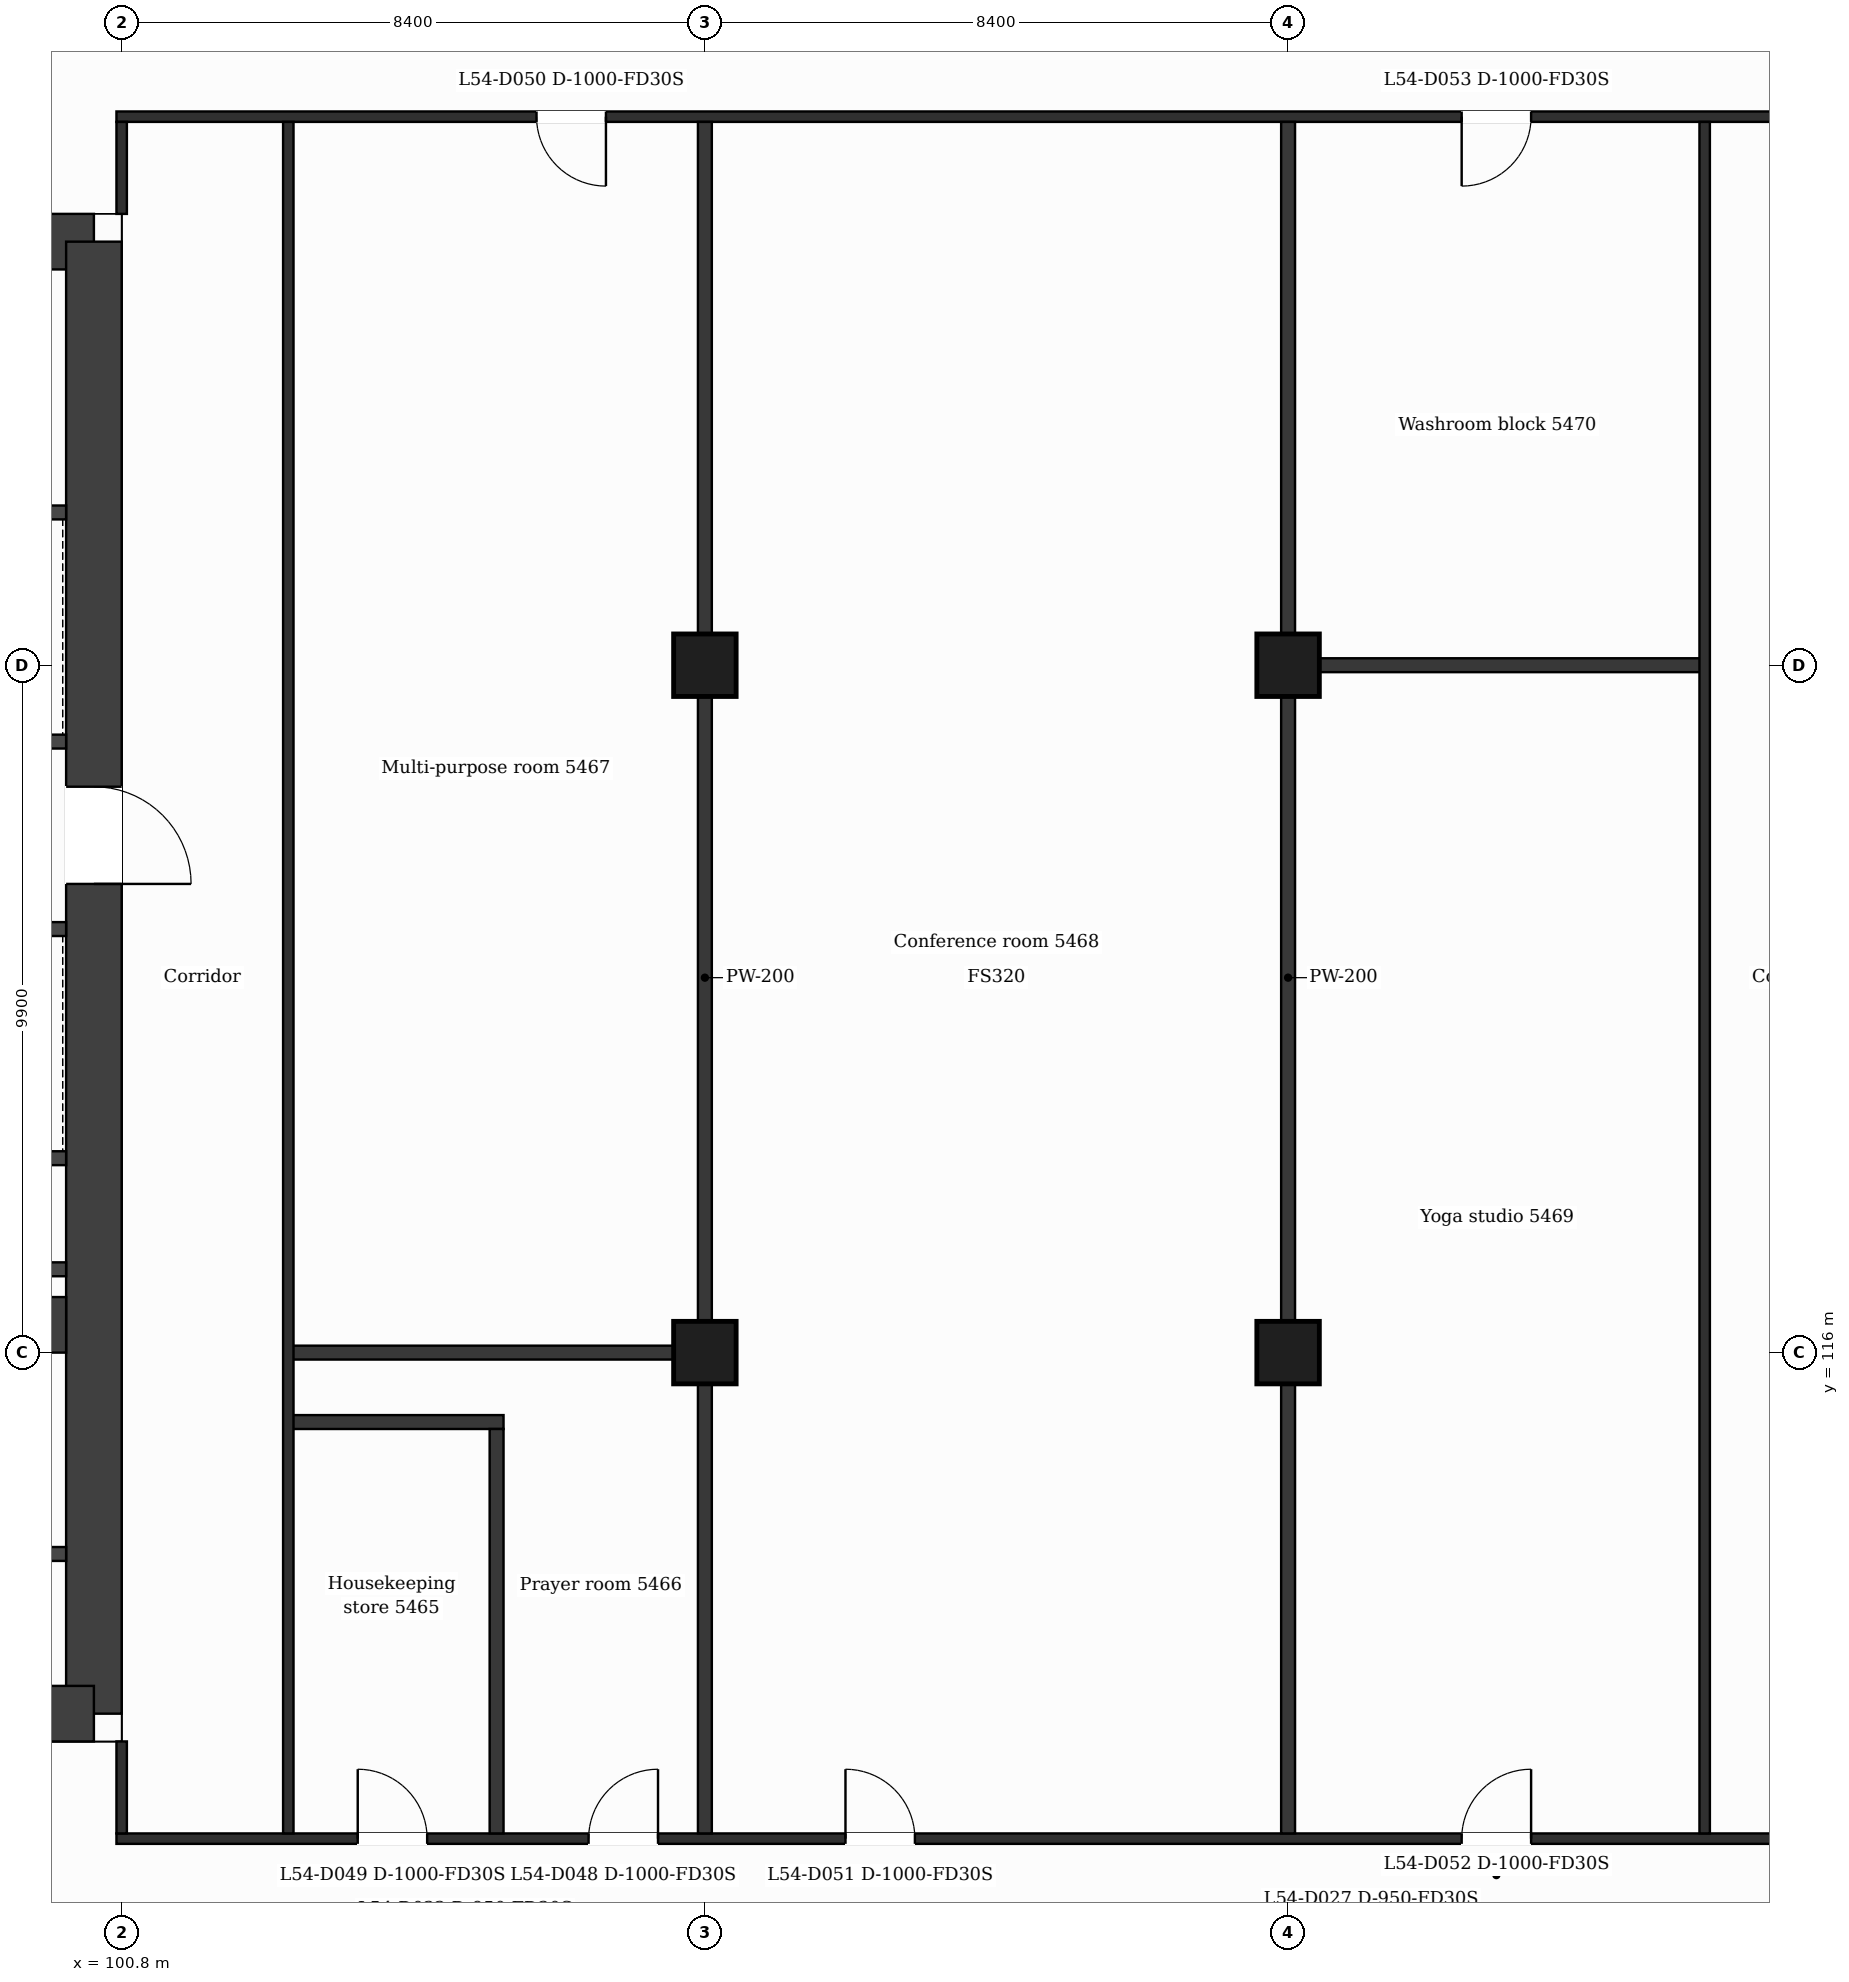
"""IFC4 building model, lengths in metres.
Left out: names, types, materials, properties, quantities, classifications, styles, units other than length and angle.
Written with IfcOpenShell. Run it as: python <this file> out.ifc"""

import sys

from ifc_helpers import new_model, si_unit, direction, frame, frame_2d, origin, origin_2d, place, context, subcontext, project, spatial, rectangle, extrude, element, fill, save


model = new_model("IFC4")
c1 = context("Model", 3, precision=1e-05, world=origin(), true_north=direction((0.0, 1.0)))
c2 = subcontext(c1, "Body", "Model", "MODEL_VIEW")
j1 = project(units=[si_unit("LENGTHUNIT", "METRE"), si_unit("PLANEANGLEUNIT", "RADIAN")], contexts=[c1])
p1 = place(None, origin())
s1 = spatial("IfcSite", under=j1, at=p1, CompositionType="ELEMENT")
p2 = place(p1, origin())
s2 = spatial("IfcBuilding", under=s1, at=p2, CompositionType="ELEMENT")
p3 = place(p2, frame((0.0, 0.0, 224.4)))
s3 = spatial("IfcBuildingStorey", under=s2, at=p3, CompositionType="ELEMENT", Elevation=224.4)
p4 = place(p3, frame((88.98, 132.0, 0.0), z_axis=(0.0, 0.0, 1.0), x_axis=(1.0, 0.0, 0.0)))
e1 = element("IfcWall", 1, at=p4, inside=s3, PredefinedType="SHEAR", context=c2, shape_type="SweptSolid", body=[
    extrude(rectangle(XDim=11.419, YDim=0.8, at=frame_2d((5.71, 0.0))), origin(), (0.0, 0.0, 1.0), 3.7),
])
p5 = place(p4, frame((6.833, 0.0, 0.0)))
e2 = element("IfcOpeningElement", 2, at=p5, cuts=e1, PredefinedType="OPENING", context=c2, shape_type="SweptSolid", body=[
    extrude(rectangle(XDim=1.2, YDim=2.1, at=frame_2d((0.6, 1.05))), frame((0.0, 0.41, 0.0), z_axis=(0.0, -1.0, 0.0), x_axis=(1.0, 0.0, 0.0)), (0.0, 0.0, 1.0), 0.82),
])
p6 = place(p3, frame((100.4, 132.0, 0.0), z_axis=(0.0, 0.0, 1.0), x_axis=(0.0, -1.0, 0.0)))
e3 = element("IfcWall", 3, at=p6, inside=s3, PredefinedType="SHEAR", context=c2, shape_type="SweptSolid", body=[
    extrude(rectangle(XDim=21.2, YDim=0.8, at=frame_2d((10.6, 0.0))), origin(), (0.0, 0.0, 1.0), 3.7),
])
p7 = place(p6, frame((7.85, 0.0, 0.0)))
e4 = element("IfcOpeningElement", 4, at=p7, cuts=e3, PredefinedType="OPENING", context=c2, shape_type="SweptSolid", body=[
    extrude(rectangle(XDim=1.4, YDim=2.1, at=frame_2d((0.7, 1.05))), frame((0.0, 0.41, 0.0), z_axis=(0.0, -1.0, 0.0), x_axis=(1.0, 0.0, 0.0)), (0.0, 0.0, 1.0), 0.82),
])
p8 = place(p3, frame((100.4, 110.8, 0.0), z_axis=(0.0, 0.0, 1.0), x_axis=(-1.0, 0.0, 0.0)))
e5 = element("IfcWall", 5, at=p8, inside=s3, PredefinedType="SHEAR", context=c2, shape_type="SweptSolid", body=[
    extrude(rectangle(XDim=14.273, YDim=0.8, at=frame_2d((7.137, 0.0))), origin(), (0.0, 0.0, 1.0), 3.7),
])
p9 = place(p8, frame((5.908, 0.0, 0.0)))
e6 = element("IfcOpeningElement", 6, at=p9, cuts=e5, PredefinedType="OPENING", context=c2, shape_type="SweptSolid", body=[
    extrude(rectangle(XDim=1.4, YDim=2.1, at=frame_2d((0.7, 1.05))), frame((0.0, 0.41, 0.0), z_axis=(0.0, -1.0, 0.0), x_axis=(1.0, 0.0, 0.0)), (0.0, 0.0, 1.0), 0.82),
])
p10 = place(p3, frame((94.7, 116.4, 0.0), z_axis=(0.0, 0.0, 1.0), x_axis=(1.0, 0.0, 0.0)))
e7 = element("IfcWall", 7, at=p10, inside=s3, PredefinedType="SHEAR", context=c2, shape_type="SweptSolid", body=[
    extrude(rectangle(XDim=5.3, YDim=0.8, at=frame_2d((2.65, 0.0))), origin(), (0.0, 0.0, 1.0), 3.7),
])
for number, where, z_axis, x_axis in (
    (8, (109.2, 116.0, 0.0), (0.0, 0.0, 1.0), (1.0, 0.0, 0.0)),
    (9, (117.6, 116.0, 0.0), (0.0, 0.0, 1.0), (1.0, 0.0, 0.0)),
    (10, (109.2, 125.9, 0.0), (0.0, 0.0, 1.0), (1.0, 0.0, 0.0)),
    (11, (117.6, 125.9, 0.0), (0.0, 0.0, 1.0), (1.0, 0.0, 0.0)),
):
    element("IfcColumn", number, at=place(p3, frame(where, z_axis=z_axis, x_axis=x_axis)), inside=s3, PredefinedType="COLUMN", context=c2, shape_type="SweptSolid", body=[
        extrude(rectangle(XDim=0.9, YDim=0.9, at=origin_2d()), origin(), (0.0, 0.0, 1.0), 3.7),
    ])
p11 = place(p3, frame((100.725, 109.0, 0.0), z_axis=(0.0, 0.0, 1.0), x_axis=(1.0, 0.0, 0.0)))
e12 = element("IfcWall", 12, at=p11, inside=s3, PredefinedType="PARTITIONING", context=c2, shape_type="SweptSolid", body=[
    extrude(rectangle(XDim=25.35, YDim=0.15, at=frame_2d((12.675, 0.0))), origin(), (0.0, 0.0, 1.0), 3.38),
])
p12 = place(p11, frame((6.8, 0.0, 0.0)))
e13 = element("IfcOpeningElement", 13, at=p12, cuts=e12, PredefinedType="OPENING", context=c2, shape_type="SweptSolid", body=[
    extrude(rectangle(XDim=1.0, YDim=2.1, at=frame_2d((0.5, 1.05))), frame((0.0, 0.085, 0.0), z_axis=(0.0, -1.0, 0.0), x_axis=(1.0, 0.0, 0.0)), (0.0, 0.0, 1.0), 0.17),
])
p13 = place(p11, frame((3.475, 0.0, 0.0)))
e14 = element("IfcOpeningElement", 14, at=p13, cuts=e12, PredefinedType="OPENING", context=c2, shape_type="SweptSolid", body=[
    extrude(rectangle(XDim=1.0, YDim=2.1, at=frame_2d((0.5, 1.05))), frame((0.0, 0.085, 0.0), z_axis=(0.0, -1.0, 0.0), x_axis=(1.0, 0.0, 0.0)), (0.0, 0.0, 1.0), 0.17),
])
p14 = place(p11, frame((10.5, 0.0, 0.0)))
e15 = element("IfcOpeningElement", 15, at=p14, cuts=e12, PredefinedType="OPENING", context=c2, shape_type="SweptSolid", body=[
    extrude(rectangle(XDim=1.0, YDim=2.1, at=frame_2d((0.5, 1.05))), frame((0.0, 0.085, 0.0), z_axis=(0.0, -1.0, 0.0), x_axis=(1.0, 0.0, 0.0)), (0.0, 0.0, 1.0), 0.17),
])
p15 = place(p11, frame((19.375, 0.0, 0.0)))
e16 = element("IfcOpeningElement", 16, at=p15, cuts=e12, PredefinedType="OPENING", context=c2, shape_type="SweptSolid", body=[
    extrude(rectangle(XDim=1.0, YDim=2.1, at=frame_2d((0.5, 1.05))), frame((0.0, 0.085, 0.0), z_axis=(0.0, -1.0, 0.0), x_axis=(1.0, 0.0, 0.0)), (0.0, 0.0, 1.0), 0.17),
])
p16 = place(p3, frame((95.127, 113.1, 0.0), z_axis=(0.0, 0.0, 1.0), x_axis=(1.0, 0.0, 0.0)))
e17 = element("IfcWall", 17, at=p16, inside=s3, PredefinedType="PARTITIONING", context=c2, shape_type="SweptSolid", body=[
    extrude(rectangle(XDim=4.873, YDim=0.2, at=frame_2d((2.437, 0.0))), origin(), (0.0, 0.0, 1.0), 3.38),
])
p17 = place(p16, frame((3.23, 0.0, 0.0)))
e18 = element("IfcOpeningElement", 18, at=p17, cuts=e17, PredefinedType="OPENING", context=c2, shape_type="SweptSolid", body=[
    extrude(rectangle(XDim=0.9, YDim=2.1, at=frame_2d((0.45, 1.05))), frame((0.0, 0.11, 0.0), z_axis=(0.0, -1.0, 0.0), x_axis=(1.0, 0.0, 0.0)), (0.0, 0.0, 1.0), 0.22),
])
p18 = place(p3, frame((103.2, 115.0, 0.0), z_axis=(0.0, 0.0, 1.0), x_axis=(1.0, 0.0, 0.0)))
e19 = element("IfcWall", 19, at=p18, inside=s3, PredefinedType="PARTITIONING", context=c2, shape_type="SweptSolid", body=[
    extrude(rectangle(XDim=3.1, YDim=0.2, at=frame_2d((1.55, 0.0))), origin(), (0.0, 0.0, 1.0), 3.38),
])
p19 = place(p3, frame((103.2, 116.0, 0.0), z_axis=(0.0, 0.0, 1.0), x_axis=(1.0, 0.0, 0.0)))
e20 = element("IfcWall", 20, at=p19, inside=s3, PredefinedType="PARTITIONING", context=c2, shape_type="SweptSolid", body=[
    extrude(rectangle(XDim=6.0, YDim=0.2, at=frame_2d((3.0, 0.0))), origin(), (0.0, 0.0, 1.0), 3.38),
])
for number, where, z_axis, x_axis in (
    (21, (95.227, 117.2, 0.0), (0.0, 0.0, 1.0), (1.0, 0.0, 0.0)),
    (22, (95.227, 118.8, 0.0), (0.0, 0.0, 1.0), (1.0, 0.0, 0.0)),
):
    element("IfcWall", number, at=place(p3, frame(where, z_axis=z_axis, x_axis=x_axis)), inside=s3, PredefinedType="PARTITIONING", context=c2, shape_type="SweptSolid", body=[
        extrude(rectangle(XDim=4.773, YDim=0.2, at=frame_2d((2.386, 0.0))), origin(), (0.0, 0.0, 1.0), 3.38),
    ])
p20 = place(p3, frame((95.227, 122.1, 0.0), z_axis=(0.0, 0.0, 1.0), x_axis=(1.0, 0.0, 0.0)))
e23 = element("IfcWall", 23, at=p20, inside=s3, PredefinedType="PARTITIONING", context=c2, shape_type="SweptSolid", body=[
    extrude(rectangle(XDim=4.773, YDim=0.2, at=frame_2d((2.386, 0.0))), origin(), (0.0, 0.0, 1.0), 3.38),
])
p21 = place(p20, frame((0.585, 0.0, 0.0)))
e24 = element("IfcOpeningElement", 24, at=p21, cuts=e23, PredefinedType="OPENING", context=c2, shape_type="SweptSolid", body=[
    extrude(rectangle(XDim=1.1, YDim=2.1, at=frame_2d((0.55, 1.05))), frame((0.0, 0.11, 0.0), z_axis=(0.0, -1.0, 0.0), x_axis=(1.0, 0.0, 0.0)), (0.0, 0.0, 1.0), 0.22),
])
p22 = place(p20, frame((3.03, 0.0, 0.0)))
e25 = element("IfcOpeningElement", 25, at=p22, cuts=e23, PredefinedType="OPENING", context=c2, shape_type="SweptSolid", body=[
    extrude(rectangle(XDim=1.1, YDim=2.1, at=frame_2d((0.55, 1.05))), frame((0.0, 0.11, 0.0), z_axis=(0.0, -1.0, 0.0), x_axis=(1.0, 0.0, 0.0)), (0.0, 0.0, 1.0), 0.22),
])
p23 = place(p3, frame((92.702, 124.8, 0.0), z_axis=(0.0, 0.0, 1.0), x_axis=(1.0, 0.0, 0.0)))
e26 = element("IfcWall", 26, at=p23, inside=s3, PredefinedType="PARTITIONING", context=c2, shape_type="SweptSolid", body=[
    extrude(rectangle(XDim=7.298, YDim=0.2, at=frame_2d((3.649, 0.0))), origin(), (0.0, 0.0, 1.0), 3.38),
])
p24 = place(p23, frame((5.405, 0.0, 0.0)))
e27 = element("IfcOpeningElement", 27, at=p24, cuts=e26, PredefinedType="OPENING", context=c2, shape_type="SweptSolid", body=[
    extrude(rectangle(XDim=1.1, YDim=2.1, at=frame_2d((0.55, 1.05))), frame((0.0, 0.11, 0.0), z_axis=(0.0, -1.0, 0.0), x_axis=(1.0, 0.0, 0.0)), (0.0, 0.0, 1.0), 0.22),
])
p25 = place(p3, frame((117.6, 125.9, 0.0), z_axis=(0.0, 0.0, 1.0), x_axis=(1.0, 0.0, 0.0)))
e28 = element("IfcWall", 28, at=p25, inside=s3, PredefinedType="PARTITIONING", context=c2, shape_type="SweptSolid", body=[
    extrude(rectangle(XDim=6.0, YDim=0.2, at=frame_2d((3.0, 0.0))), origin(), (0.0, 0.0, 1.0), 3.38),
])
p26 = place(p3, frame((92.827, 128.1, 0.0), z_axis=(0.0, 0.0, 1.0), x_axis=(1.0, 0.0, 0.0)))
e29 = element("IfcWall", 29, at=p26, inside=s3, PredefinedType="PARTITIONING", context=c2, shape_type="SweptSolid", body=[
    extrude(rectangle(XDim=7.173, YDim=0.2, at=frame_2d((3.586, 0.0))), origin(), (0.0, 0.0, 1.0), 3.38),
])
p27 = place(p26, frame((3.184, 0.0, 0.0)))
e30 = element("IfcOpeningElement", 30, at=p27, cuts=e29, PredefinedType="OPENING", context=c2, shape_type="SweptSolid", body=[
    extrude(rectangle(XDim=1.1, YDim=2.1, at=frame_2d((0.55, 1.05))), frame((0.0, 0.11, 0.0), z_axis=(0.0, -1.0, 0.0), x_axis=(1.0, 0.0, 0.0)), (0.0, 0.0, 1.0), 0.22),
])
p28 = place(p3, frame((100.725, 133.8, 0.0), z_axis=(0.0, 0.0, 1.0), x_axis=(1.0, 0.0, 0.0)))
e31 = element("IfcWall", 31, at=p28, inside=s3, PredefinedType="PARTITIONING", context=c2, shape_type="SweptSolid", body=[
    extrude(rectangle(XDim=25.35, YDim=0.15, at=frame_2d((12.675, 0.0))), origin(), (0.0, 0.0, 1.0), 3.38),
])
p29 = place(p28, frame((6.05, 0.0, 0.0)))
e32 = element("IfcOpeningElement", 32, at=p29, cuts=e31, PredefinedType="OPENING", context=c2, shape_type="SweptSolid", body=[
    extrude(rectangle(XDim=1.0, YDim=2.1, at=frame_2d((0.5, 1.05))), frame((0.0, 0.085, 0.0), z_axis=(0.0, -1.0, 0.0), x_axis=(1.0, 0.0, 0.0)), (0.0, 0.0, 1.0), 0.17),
])
p30 = place(p28, frame((19.375, 0.0, 0.0)))
e33 = element("IfcOpeningElement", 33, at=p30, cuts=e31, PredefinedType="OPENING", context=c2, shape_type="SweptSolid", body=[
    extrude(rectangle(XDim=1.0, YDim=2.1, at=frame_2d((0.5, 1.05))), frame((0.0, 0.085, 0.0), z_axis=(0.0, -1.0, 0.0), x_axis=(1.0, 0.0, 0.0)), (0.0, 0.0, 1.0), 0.17),
])
p31 = place(p3, frame((100.8, 109.075, 0.0), z_axis=(0.0, 0.0, 1.0), x_axis=(0.0, 1.0, 0.0)))
e34 = element("IfcWall", 34, at=p31, inside=s3, PredefinedType="PARTITIONING", context=c2, shape_type="SweptSolid", body=[
    extrude(rectangle(XDim=1.325, YDim=0.15, at=frame_2d((0.663, 0.0))), origin(), (0.0, 0.0, 1.0), 3.38),
])
p32 = place(p3, frame((100.8, 132.4, 0.0), z_axis=(0.0, 0.0, 1.0), x_axis=(0.0, 1.0, 0.0)))
e35 = element("IfcWall", 35, at=p32, inside=s3, PredefinedType="PARTITIONING", context=c2, shape_type="SweptSolid", body=[
    extrude(rectangle(XDim=1.325, YDim=0.15, at=frame_2d((0.663, 0.0))), origin(), (0.0, 0.0, 1.0), 3.38),
])
p33 = place(p3, frame((103.2, 109.075, 0.0), z_axis=(0.0, 0.0, 1.0), x_axis=(0.0, 1.0, 0.0)))
e36 = element("IfcWall", 36, at=p33, inside=s3, PredefinedType="PARTITIONING", context=c2, shape_type="SweptSolid", body=[
    extrude(rectangle(XDim=24.65, YDim=0.15, at=frame_2d((12.325, 0.0))), origin(), (0.0, 0.0, 1.0), 3.38),
])
p34 = place(p3, frame((106.2, 109.075, 0.0), z_axis=(0.0, 0.0, 1.0), x_axis=(0.0, 1.0, 0.0)))
e37 = element("IfcWall", 37, at=p34, inside=s3, PredefinedType="PARTITIONING", context=c2, shape_type="SweptSolid", body=[
    extrude(rectangle(XDim=5.825, YDim=0.2, at=frame_2d((2.913, 0.0))), origin(), (0.0, 0.0, 1.0), 3.38),
])
for number, where, z_axis, x_axis in (
    (38, (109.2, 109.075, 0.0), (0.0, 0.0, 1.0), (0.0, 1.0, 0.0)),
    (39, (117.6, 109.075, 0.0), (0.0, 0.0, 1.0), (0.0, 1.0, 0.0)),
):
    element("IfcWall", number, at=place(p3, frame(where, z_axis=z_axis, x_axis=x_axis)), inside=s3, PredefinedType="PARTITIONING", context=c2, shape_type="SweptSolid", body=[
        extrude(rectangle(XDim=24.65, YDim=0.2, at=frame_2d((12.325, 0.0))), origin(), (0.0, 0.0, 1.0), 3.38),
    ])
p35 = place(p3, frame((123.6, 109.075, 0.0), z_axis=(0.0, 0.0, 1.0), x_axis=(0.0, 1.0, 0.0)))
e40 = element("IfcWall", 40, at=p35, inside=s3, PredefinedType="PARTITIONING", context=c2, shape_type="SweptSolid", body=[
    extrude(rectangle(XDim=24.65, YDim=0.15, at=frame_2d((12.325, 0.0))), origin(), (0.0, 0.0, 1.0), 3.38),
])
p36 = place(p12, origin())
e41 = element("IfcDoor", 41, at=p36, inside=s3, OperationType="SINGLE_SWING_RIGHT", PredefinedType="DOOR", context=c2, shape_type="SweptSolid", body=[
    extrude(rectangle(XDim=1.0, YDim=2.1, at=frame_2d((0.5, 1.05))), frame((0.0, 0.025, 0.0), z_axis=(0.0, -1.0, 0.0), x_axis=(1.0, 0.0, 0.0)), (0.0, 0.0, 1.0), 0.05),
])
fill(e13, e41)
p37 = place(p13, origin())
e42 = element("IfcDoor", 42, at=p37, inside=s3, OperationType="SINGLE_SWING_LEFT", PredefinedType="DOOR", context=c2, shape_type="SweptSolid", body=[
    extrude(rectangle(XDim=1.0, YDim=2.1, at=frame_2d((0.5, 1.05))), frame((0.0, 0.025, 0.0), z_axis=(0.0, -1.0, 0.0), x_axis=(1.0, 0.0, 0.0)), (0.0, 0.0, 1.0), 0.05),
])
fill(e14, e42)
p38 = place(p29, origin())
e43 = element("IfcDoor", 43, at=p38, inside=s3, OperationType="SINGLE_SWING_RIGHT", PredefinedType="DOOR", context=c2, shape_type="SweptSolid", body=[
    extrude(rectangle(XDim=1.0, YDim=2.1, at=frame_2d((0.5, 1.05))), frame((0.0, 0.025, 0.0), z_axis=(0.0, -1.0, 0.0), x_axis=(1.0, 0.0, 0.0)), (0.0, 0.0, 1.0), 0.05),
])
fill(e32, e43)
p39 = place(p14, origin())
e44 = element("IfcDoor", 44, at=p39, inside=s3, OperationType="SINGLE_SWING_LEFT", PredefinedType="DOOR", context=c2, shape_type="SweptSolid", body=[
    extrude(rectangle(XDim=1.0, YDim=2.1, at=frame_2d((0.5, 1.05))), frame((0.0, 0.025, 0.0), z_axis=(0.0, -1.0, 0.0), x_axis=(1.0, 0.0, 0.0)), (0.0, 0.0, 1.0), 0.05),
])
fill(e15, e44)
p40 = place(p15, origin())
e45 = element("IfcDoor", 45, at=p40, inside=s3, OperationType="SINGLE_SWING_RIGHT", PredefinedType="DOOR", context=c2, shape_type="SweptSolid", body=[
    extrude(rectangle(XDim=1.0, YDim=2.1, at=frame_2d((0.5, 1.05))), frame((0.0, 0.025, 0.0), z_axis=(0.0, -1.0, 0.0), x_axis=(1.0, 0.0, 0.0)), (0.0, 0.0, 1.0), 0.05),
])
fill(e16, e45)
p41 = place(p30, origin())
e46 = element("IfcDoor", 46, at=p41, inside=s3, OperationType="SINGLE_SWING_LEFT", PredefinedType="DOOR", context=c2, shape_type="SweptSolid", body=[
    extrude(rectangle(XDim=1.0, YDim=2.1, at=frame_2d((0.5, 1.05))), frame((0.0, 0.025, 0.0), z_axis=(0.0, -1.0, 0.0), x_axis=(1.0, 0.0, 0.0)), (0.0, 0.0, 1.0), 0.05),
])
fill(e33, e46)
p42 = place(p7, origin())
e47 = element("IfcDoor", 47, at=p42, inside=s3, OperationType="SINGLE_SWING_RIGHT", PredefinedType="DOOR", context=c2, shape_type="SweptSolid", body=[
    extrude(rectangle(XDim=1.4, YDim=2.1, at=frame_2d((0.7, 1.05))), frame((0.0, 0.025, 0.0), z_axis=(0.0, -1.0, 0.0), x_axis=(1.0, 0.0, 0.0)), (0.0, 0.0, 1.0), 0.05),
])
fill(e4, e47)
save(model, sys.argv[1])
